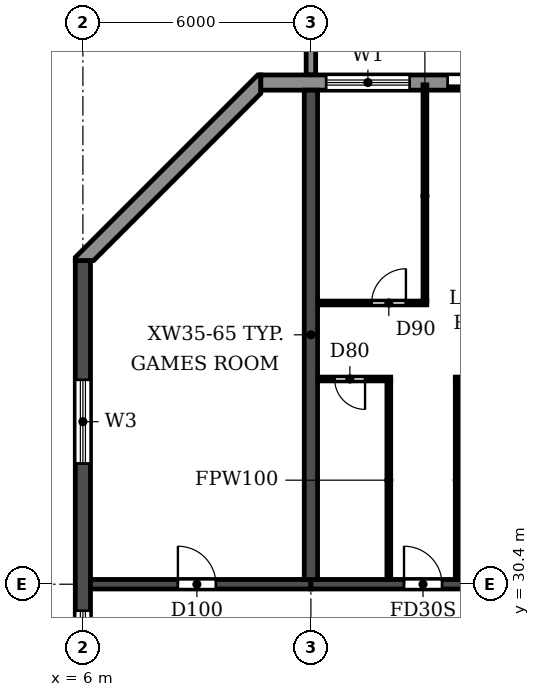
"""IFC4 building model, lengths in metres.
Left out: names, types, materials, properties, quantities, classifications, styles, units other than length and angle.
Written with IfcOpenShell. Run it as: python <this file> out.ifc"""

import sys

from ifc_helpers import new_model, si_unit, direction, frame, frame_2d, origin, place, context, subcontext, project, spatial, polyline, rectangle, outline, extrude, source, transform, mapped, element, fill, save


model = new_model("IFC4")
c1 = context("Model", 3, precision=1e-05, world=origin(), true_north=direction((0.0, 1.0)))
c2 = subcontext(c1, "Body", "Model", "MODEL_VIEW")
j1 = project(units=[si_unit("LENGTHUNIT", "METRE"), si_unit("PLANEANGLEUNIT", "RADIAN")], contexts=[c1])
p1 = place(None, origin())
s1 = spatial("IfcSite", under=j1, at=p1, CompositionType="ELEMENT")
p2 = place(p1, origin())
s2 = spatial("IfcBuilding", under=s1, at=p2, CompositionType="ELEMENT")
p3 = place(p2, frame((0.0, 0.0, 102.6)))
s3 = spatial("IfcBuildingStorey", under=s2, at=p3, CompositionType="ELEMENT", Elevation=102.6)
p4 = place(p3, frame((12.0, 30.525, 0.0), z_axis=(0.0, 0.0, 1.0), x_axis=(0.0, 1.0, 0.0)))
e1 = element("IfcWall", 1, at=p4, inside=s3, PredefinedType="SHEAR", context=c2, shape_type="SweptSolid", body=[
    extrude(rectangle(XDim=12.875, YDim=0.35, at=frame_2d((6.438, 0.0))), origin(), (0.0, 0.0, 1.0), 3.0),
])
p5 = place(p3, frame((6.0, 4.683, 0.0), z_axis=(0.0, 0.0, 1.0), x_axis=(0.0, 1.0, 0.0)))
e2 = element("IfcWall", 2, at=p5, inside=s3, PredefinedType="SHEAR", context=c2, shape_type="SweptSolid", body=[
    extrude(rectangle(XDim=34.234, YDim=0.4, at=frame_2d((17.117, 0.0))), origin(), (0.0, 0.0, 1.0), 3.0),
])
p6 = place(p5, frame((23.817, 0.0, 0.9)))
e3 = element("IfcOpeningElement", 3, at=p6, cuts=e2, PredefinedType="OPENING", context=c2, shape_type="SweptSolid", body=[
    extrude(rectangle(XDim=1.2, YDim=1.5, at=frame_2d((0.6, 0.75))), frame((0.0, 0.21, 0.0), z_axis=(0.0, -1.0, 0.0), x_axis=(1.0, 0.0, 0.0)), (0.0, 0.0, 1.0), 0.42),
])
p7 = place(p5, frame((8.017, 0.0, 0.9)))
e4 = element("IfcOpeningElement", 4, at=p7, cuts=e2, PredefinedType="OPENING", context=c2, shape_type="SweptSolid", body=[
    extrude(rectangle(XDim=1.2, YDim=1.5, at=frame_2d((0.6, 0.75))), frame((0.0, 0.21, 0.0), z_axis=(0.0, -1.0, 0.0), x_axis=(1.0, 0.0, 0.0)), (0.0, 0.0, 1.0), 0.42),
])
p8 = place(p5, frame((15.917, 0.0, 0.9)))
e5 = element("IfcOpeningElement", 5, at=p8, cuts=e2, PredefinedType="OPENING", context=c2, shape_type="SweptSolid", body=[
    extrude(rectangle(XDim=1.2, YDim=1.5, at=frame_2d((0.6, 0.75))), frame((0.0, 0.21, 0.0), z_axis=(0.0, -1.0, 0.0), x_axis=(1.0, 0.0, 0.0)), (0.0, 0.0, 1.0), 0.42),
])
p9 = place(p5, frame((28.894, 0.0, 0.6)))
e6 = element("IfcOpeningElement", 6, at=p9, cuts=e2, PredefinedType="OPENING", context=c2, shape_type="SweptSolid", body=[
    extrude(rectangle(XDim=2.2, YDim=1.8, at=frame_2d((1.1, 0.9))), frame((0.0, 0.21, 0.0), z_axis=(0.0, -1.0, 0.0), x_axis=(1.0, 0.0, 0.0)), (0.0, 0.0, 1.0), 0.42),
])
p10 = place(p5, frame((2.541, 0.0, 0.6)))
e7 = element("IfcOpeningElement", 7, at=p10, cuts=e2, PredefinedType="OPENING", context=c2, shape_type="SweptSolid", body=[
    extrude(rectangle(XDim=2.2, YDim=1.8, at=frame_2d((1.1, 0.9))), frame((0.0, 0.21, 0.0), z_axis=(0.0, -1.0, 0.0), x_axis=(1.0, 0.0, 0.0)), (0.0, 0.0, 1.0), 0.42),
])
p11 = place(p3, frame((6.2, 30.4, 0.0), z_axis=(0.0, 0.0, 1.0), x_axis=(1.0, 0.0, 0.0)))
e8 = element("IfcWall", 8, at=p11, inside=s3, PredefinedType="SHEAR", context=c2, shape_type="SweptSolid", body=[
    extrude(rectangle(XDim=5.8, YDim=0.25, at=frame_2d((2.9, 0.0))), origin(), (0.0, 0.0, 1.0), 2.4),
])
p12 = place(p11, frame((2.3, 0.0, 0.0)))
e9 = element("IfcOpeningElement", 9, at=p12, cuts=e8, PredefinedType="OPENING", context=c2, shape_type="SweptSolid", body=[
    extrude(rectangle(XDim=1.0, YDim=2.1, at=frame_2d((0.5, 1.05))), frame((0.0, 0.135, 0.0), z_axis=(0.0, -1.0, 0.0), x_axis=(1.0, 0.0, 0.0)), (0.0, 0.0, 1.0), 0.27),
])
p13 = place(p3, frame((12.0, 30.4, 0.0), z_axis=(0.0, 0.0, 1.0), x_axis=(1.0, 0.0, 0.0)))
e10 = element("IfcWall", 10, at=p13, inside=s3, PredefinedType="SHEAR", context=c2, shape_type="SweptSolid", body=[
    extrude(rectangle(XDim=6.0, YDim=0.25, at=frame_2d((3.0, 0.0))), origin(), (0.0, 0.0, 1.0), 2.4),
])
p14 = place(p13, frame((2.45, 0.0, 0.0)))
e11 = element("IfcOpeningElement", 11, at=p14, cuts=e10, PredefinedType="OPENING", context=c2, shape_type="SweptSolid", body=[
    extrude(rectangle(XDim=1.0, YDim=2.1, at=frame_2d((0.5, 1.05))), frame((0.0, 0.135, 0.0), z_axis=(0.0, -1.0, 0.0), x_axis=(1.0, 0.0, 0.0)), (0.0, 0.0, 1.0), 0.27),
])
p15 = place(p3, frame((91.317, 43.6, 0.0), z_axis=(0.0, 0.0, 1.0), x_axis=(-1.0, 0.0, 0.0)))
e12 = element("IfcWall", 12, at=p15, inside=s3, PredefinedType="STANDARD", context=c2, shape_type="SweptSolid", body=[
    extrude(rectangle(XDim=80.634, YDim=0.4, at=frame_2d((40.317, 0.0))), origin(), (0.0, 0.0, 1.0), 3.0),
])
p16 = place(p15, frame((76.717, 0.0, 0.9)))
e13 = element("IfcOpeningElement", 13, at=p16, cuts=e12, PredefinedType="OPENING", context=c2, shape_type="SweptSolid", body=[
    extrude(rectangle(XDim=2.2, YDim=1.5, at=frame_2d((1.1, 0.75))), frame((0.0, 0.21, 0.0), z_axis=(0.0, -1.0, 0.0), x_axis=(1.0, 0.0, 0.0)), (0.0, 0.0, 1.0), 0.42),
])
p17 = place(p15, frame((73.917, 0.0, 0.0)))
e14 = element("IfcOpeningElement", 14, at=p17, cuts=e12, PredefinedType="OPENING", context=c2, shape_type="SweptSolid", body=[
    extrude(rectangle(XDim=1.8, YDim=2.4, at=frame_2d((0.9, 1.2))), frame((0.0, 0.21, 0.0), z_axis=(0.0, -1.0, 0.0), x_axis=(1.0, 0.0, 0.0)), (0.0, 0.0, 1.0), 0.42),
])
p18 = place(p15, frame((70.717, 0.0, 0.9)))
e15 = element("IfcOpeningElement", 15, at=p18, cuts=e12, PredefinedType="OPENING", context=c2, shape_type="SweptSolid", body=[
    extrude(rectangle(XDim=2.2, YDim=1.5, at=frame_2d((1.1, 0.75))), frame((0.0, 0.21, 0.0), z_axis=(0.0, -1.0, 0.0), x_axis=(1.0, 0.0, 0.0)), (0.0, 0.0, 1.0), 0.42),
])
p19 = place(p15, frame((67.717, 0.0, 0.9)))
e16 = element("IfcOpeningElement", 16, at=p19, cuts=e12, PredefinedType="OPENING", context=c2, shape_type="SweptSolid", body=[
    extrude(rectangle(XDim=2.2, YDim=1.5, at=frame_2d((1.1, 0.75))), frame((0.0, 0.21, 0.0), z_axis=(0.0, -1.0, 0.0), x_axis=(1.0, 0.0, 0.0)), (0.0, 0.0, 1.0), 0.42),
])
p20 = place(p15, frame((64.917, 0.0, 0.0)))
e17 = element("IfcOpeningElement", 17, at=p20, cuts=e12, PredefinedType="OPENING", context=c2, shape_type="SweptSolid", body=[
    extrude(rectangle(XDim=1.8, YDim=2.4, at=frame_2d((0.9, 1.2))), frame((0.0, 0.21, 0.0), z_axis=(0.0, -1.0, 0.0), x_axis=(1.0, 0.0, 0.0)), (0.0, 0.0, 1.0), 0.42),
])
p21 = place(p15, frame((61.717, 0.0, 0.9)))
e18 = element("IfcOpeningElement", 18, at=p21, cuts=e12, PredefinedType="OPENING", context=c2, shape_type="SweptSolid", body=[
    extrude(rectangle(XDim=2.2, YDim=1.5, at=frame_2d((1.1, 0.75))), frame((0.0, 0.21, 0.0), z_axis=(0.0, -1.0, 0.0), x_axis=(1.0, 0.0, 0.0)), (0.0, 0.0, 1.0), 0.42),
])
p22 = place(p15, frame((58.717, 0.0, 0.9)))
e19 = element("IfcOpeningElement", 19, at=p22, cuts=e12, PredefinedType="OPENING", context=c2, shape_type="SweptSolid", body=[
    extrude(rectangle(XDim=2.2, YDim=1.5, at=frame_2d((1.1, 0.75))), frame((0.0, 0.21, 0.0), z_axis=(0.0, -1.0, 0.0), x_axis=(1.0, 0.0, 0.0)), (0.0, 0.0, 1.0), 0.42),
])
p23 = place(p15, frame((55.717, 0.0, 0.9)))
e20 = element("IfcOpeningElement", 20, at=p23, cuts=e12, PredefinedType="OPENING", context=c2, shape_type="SweptSolid", body=[
    extrude(rectangle(XDim=2.2, YDim=1.5, at=frame_2d((1.1, 0.75))), frame((0.0, 0.21, 0.0), z_axis=(0.0, -1.0, 0.0), x_axis=(1.0, 0.0, 0.0)), (0.0, 0.0, 1.0), 0.42),
])
p24 = place(p15, frame((52.717, 0.0, 0.9)))
e21 = element("IfcOpeningElement", 21, at=p24, cuts=e12, PredefinedType="OPENING", context=c2, shape_type="SweptSolid", body=[
    extrude(rectangle(XDim=2.2, YDim=1.5, at=frame_2d((1.1, 0.75))), frame((0.0, 0.21, 0.0), z_axis=(0.0, -1.0, 0.0), x_axis=(1.0, 0.0, 0.0)), (0.0, 0.0, 1.0), 0.42),
])
p25 = place(p15, frame((49.917, 0.0, 0.0)))
e22 = element("IfcOpeningElement", 22, at=p25, cuts=e12, PredefinedType="OPENING", context=c2, shape_type="SweptSolid", body=[
    extrude(rectangle(XDim=1.8, YDim=2.4, at=frame_2d((0.9, 1.2))), frame((0.0, 0.21, 0.0), z_axis=(0.0, -1.0, 0.0), x_axis=(1.0, 0.0, 0.0)), (0.0, 0.0, 1.0), 0.42),
])
p26 = place(p15, frame((46.717, 0.0, 0.9)))
e23 = element("IfcOpeningElement", 23, at=p26, cuts=e12, PredefinedType="OPENING", context=c2, shape_type="SweptSolid", body=[
    extrude(rectangle(XDim=2.2, YDim=1.5, at=frame_2d((1.1, 0.75))), frame((0.0, 0.21, 0.0), z_axis=(0.0, -1.0, 0.0), x_axis=(1.0, 0.0, 0.0)), (0.0, 0.0, 1.0), 0.42),
])
p27 = place(p15, frame((43.917, 0.0, 0.0)))
e24 = element("IfcOpeningElement", 24, at=p27, cuts=e12, PredefinedType="OPENING", context=c2, shape_type="SweptSolid", body=[
    extrude(rectangle(XDim=1.8, YDim=2.4, at=frame_2d((0.9, 1.2))), frame((0.0, 0.21, 0.0), z_axis=(0.0, -1.0, 0.0), x_axis=(1.0, 0.0, 0.0)), (0.0, 0.0, 1.0), 0.42),
])
p28 = place(p15, frame((40.717, 0.0, 0.9)))
e25 = element("IfcOpeningElement", 25, at=p28, cuts=e12, PredefinedType="OPENING", context=c2, shape_type="SweptSolid", body=[
    extrude(rectangle(XDim=2.2, YDim=1.5, at=frame_2d((1.1, 0.75))), frame((0.0, 0.21, 0.0), z_axis=(0.0, -1.0, 0.0), x_axis=(1.0, 0.0, 0.0)), (0.0, 0.0, 1.0), 0.42),
])
p29 = place(p15, frame((37.717, 0.0, 0.9)))
e26 = element("IfcOpeningElement", 26, at=p29, cuts=e12, PredefinedType="OPENING", context=c2, shape_type="SweptSolid", body=[
    extrude(rectangle(XDim=2.2, YDim=1.5, at=frame_2d((1.1, 0.75))), frame((0.0, 0.21, 0.0), z_axis=(0.0, -1.0, 0.0), x_axis=(1.0, 0.0, 0.0)), (0.0, 0.0, 1.0), 0.42),
])
p30 = place(p15, frame((34.917, 0.0, 0.0)))
e27 = element("IfcOpeningElement", 27, at=p30, cuts=e12, PredefinedType="OPENING", context=c2, shape_type="SweptSolid", body=[
    extrude(rectangle(XDim=1.8, YDim=2.4, at=frame_2d((0.9, 1.2))), frame((0.0, 0.21, 0.0), z_axis=(0.0, -1.0, 0.0), x_axis=(1.0, 0.0, 0.0)), (0.0, 0.0, 1.0), 0.42),
])
p31 = place(p15, frame((31.717, 0.0, 0.9)))
e28 = element("IfcOpeningElement", 28, at=p31, cuts=e12, PredefinedType="OPENING", context=c2, shape_type="SweptSolid", body=[
    extrude(rectangle(XDim=2.2, YDim=1.5, at=frame_2d((1.1, 0.75))), frame((0.0, 0.21, 0.0), z_axis=(0.0, -1.0, 0.0), x_axis=(1.0, 0.0, 0.0)), (0.0, 0.0, 1.0), 0.42),
])
p32 = place(p15, frame((28.717, 0.0, 0.9)))
e29 = element("IfcOpeningElement", 29, at=p32, cuts=e12, PredefinedType="OPENING", context=c2, shape_type="SweptSolid", body=[
    extrude(rectangle(XDim=2.2, YDim=1.5, at=frame_2d((1.1, 0.75))), frame((0.0, 0.21, 0.0), z_axis=(0.0, -1.0, 0.0), x_axis=(1.0, 0.0, 0.0)), (0.0, 0.0, 1.0), 0.42),
])
p33 = place(p15, frame((25.917, 0.0, 0.0)))
e30 = element("IfcOpeningElement", 30, at=p33, cuts=e12, PredefinedType="OPENING", context=c2, shape_type="SweptSolid", body=[
    extrude(rectangle(XDim=1.8, YDim=2.4, at=frame_2d((0.9, 1.2))), frame((0.0, 0.21, 0.0), z_axis=(0.0, -1.0, 0.0), x_axis=(1.0, 0.0, 0.0)), (0.0, 0.0, 1.0), 0.42),
])
p34 = place(p15, frame((22.717, 0.0, 0.9)))
e31 = element("IfcOpeningElement", 31, at=p34, cuts=e12, PredefinedType="OPENING", context=c2, shape_type="SweptSolid", body=[
    extrude(rectangle(XDim=2.2, YDim=1.5, at=frame_2d((1.1, 0.75))), frame((0.0, 0.21, 0.0), z_axis=(0.0, -1.0, 0.0), x_axis=(1.0, 0.0, 0.0)), (0.0, 0.0, 1.0), 0.42),
])
p35 = place(p15, frame((19.717, 0.0, 0.9)))
e32 = element("IfcOpeningElement", 32, at=p35, cuts=e12, PredefinedType="OPENING", context=c2, shape_type="SweptSolid", body=[
    extrude(rectangle(XDim=2.2, YDim=1.5, at=frame_2d((1.1, 0.75))), frame((0.0, 0.21, 0.0), z_axis=(0.0, -1.0, 0.0), x_axis=(1.0, 0.0, 0.0)), (0.0, 0.0, 1.0), 0.42),
])
p36 = place(p15, frame((16.917, 0.0, 0.0)))
e33 = element("IfcOpeningElement", 33, at=p36, cuts=e12, PredefinedType="OPENING", context=c2, shape_type="SweptSolid", body=[
    extrude(rectangle(XDim=1.8, YDim=2.4, at=frame_2d((0.9, 1.2))), frame((0.0, 0.21, 0.0), z_axis=(0.0, -1.0, 0.0), x_axis=(1.0, 0.0, 0.0)), (0.0, 0.0, 1.0), 0.42),
])
p37 = place(p15, frame((13.717, 0.0, 0.9)))
e34 = element("IfcOpeningElement", 34, at=p37, cuts=e12, PredefinedType="OPENING", context=c2, shape_type="SweptSolid", body=[
    extrude(rectangle(XDim=2.2, YDim=1.5, at=frame_2d((1.1, 0.75))), frame((0.0, 0.21, 0.0), z_axis=(0.0, -1.0, 0.0), x_axis=(1.0, 0.0, 0.0)), (0.0, 0.0, 1.0), 0.42),
])
p38 = place(p15, frame((10.917, 0.0, 0.0)))
e35 = element("IfcOpeningElement", 35, at=p38, cuts=e12, PredefinedType="OPENING", context=c2, shape_type="SweptSolid", body=[
    extrude(rectangle(XDim=1.8, YDim=2.4, at=frame_2d((0.9, 1.2))), frame((0.0, 0.21, 0.0), z_axis=(0.0, -1.0, 0.0), x_axis=(1.0, 0.0, 0.0)), (0.0, 0.0, 1.0), 0.42),
])
p39 = place(p15, frame((7.717, 0.0, 0.9)))
e36 = element("IfcOpeningElement", 36, at=p39, cuts=e12, PredefinedType="OPENING", context=c2, shape_type="SweptSolid", body=[
    extrude(rectangle(XDim=2.2, YDim=1.5, at=frame_2d((1.1, 0.75))), frame((0.0, 0.21, 0.0), z_axis=(0.0, -1.0, 0.0), x_axis=(1.0, 0.0, 0.0)), (0.0, 0.0, 1.0), 0.42),
])
p40 = place(p15, frame((4.717, 0.0, 0.9)))
e37 = element("IfcOpeningElement", 37, at=p40, cuts=e12, PredefinedType="OPENING", context=c2, shape_type="SweptSolid", body=[
    extrude(rectangle(XDim=2.2, YDim=1.5, at=frame_2d((1.1, 0.75))), frame((0.0, 0.21, 0.0), z_axis=(0.0, -1.0, 0.0), x_axis=(1.0, 0.0, 0.0)), (0.0, 0.0, 1.0), 0.42),
])
p41 = place(p15, frame((1.917, 0.0, 0.0)))
e38 = element("IfcOpeningElement", 38, at=p41, cuts=e12, PredefinedType="OPENING", context=c2, shape_type="SweptSolid", body=[
    extrude(rectangle(XDim=1.8, YDim=2.4, at=frame_2d((0.9, 1.2))), frame((0.0, 0.21, 0.0), z_axis=(0.0, -1.0, 0.0), x_axis=(1.0, 0.0, 0.0)), (0.0, 0.0, 1.0), 0.42),
])
p42 = place(p3, origin())
e39 = element("IfcWall", 39, at=p42, inside=s3, PredefinedType="STANDARD", context=c2, shape_type="SweptSolid", body=[
    extrude(outline(polyline([(10.683, 43.8), (10.6, 43.8), (5.8, 39.0), (5.8, 38.917), (6.283, 38.917), (10.683, 43.317), (10.683, 43.8)])), origin(), (0.0, 0.0, 1.0), 3.0),
])
m1 = source(origin(), c2, "Body", "SweptSolid", [
    extrude(outline(polyline([(0.0, 0.0), (0.25, 0.0), (0.25, 3.1), (0.0, 3.1), (0.0, 0.0)])), origin(), (0.0, 0.0, 1.0), 3.1),
])
p43 = place(p3, frame((11.875, 43.8, 0.0)))
e40 = element("IfcWall", 40, at=p43, inside=s3, PredefinedType="STANDARD", context=c2, shape_type="MappedRepresentation", body=[
    mapped(m1, transform((0.0, 0.0, 0.0))),
])
p44 = place(p3, frame((12.185, 35.8, 0.0), z_axis=(0.0, 0.0, 1.0), x_axis=(1.0, 0.0, 0.0)))
e41 = element("IfcWall", 41, at=p44, inside=s3, PredefinedType="PARTITIONING", context=c2, shape_type="SweptSolid", body=[
    extrude(rectangle(XDim=1.915, YDim=0.1, at=frame_2d((0.958, 0.0))), origin(), (0.0, 0.0, 1.0), 3.0),
])
p45 = place(p44, frame((0.44, 0.0, 0.0)))
e42 = element("IfcOpeningElement", 42, at=p45, cuts=e41, PredefinedType="OPENING", context=c2, shape_type="SweptSolid", body=[
    extrude(rectangle(XDim=0.8, YDim=2.1, at=frame_2d((0.4, 1.05))), frame((0.0, 0.06, 0.0), z_axis=(0.0, -1.0, 0.0), x_axis=(1.0, 0.0, 0.0)), (0.0, 0.0, 1.0), 0.12),
])
p46 = place(p3, frame((15.8, 35.8, 0.0), z_axis=(0.0, 0.0, 1.0), x_axis=(1.0, 0.0, 0.0)))
e43 = element("IfcWall", 43, at=p46, inside=s3, PredefinedType="PARTITIONING", context=c2, shape_type="SweptSolid", body=[
    extrude(rectangle(XDim=2.015, YDim=0.1, at=frame_2d((1.007, 0.0))), origin(), (0.0, 0.0, 1.0), 3.0),
])
p47 = place(p46, frame((0.675, 0.0, 0.0)))
e44 = element("IfcOpeningElement", 44, at=p47, cuts=e43, PredefinedType="OPENING", context=c2, shape_type="SweptSolid", body=[
    extrude(rectangle(XDim=0.9, YDim=2.1, at=frame_2d((0.45, 1.05))), frame((0.0, 0.06, 0.0), z_axis=(0.0, -1.0, 0.0), x_axis=(1.0, 0.0, 0.0)), (0.0, 0.0, 1.0), 0.12),
])
p48 = place(p3, frame((12.185, 37.8, 0.0), z_axis=(0.0, 0.0, 1.0), x_axis=(1.0, 0.0, 0.0)))
e45 = element("IfcWall", 45, at=p48, inside=s3, PredefinedType="PARTITIONING", context=c2, shape_type="SweptSolid", body=[
    extrude(rectangle(XDim=2.865, YDim=0.1, at=frame_2d((1.433, 0.0))), origin(), (0.0, 0.0, 1.0), 3.0),
])
p49 = place(p48, frame((1.415, 0.0, 0.0)))
e46 = element("IfcOpeningElement", 46, at=p49, cuts=e45, PredefinedType="OPENING", context=c2, shape_type="SweptSolid", body=[
    extrude(rectangle(XDim=0.9, YDim=2.1, at=frame_2d((0.45, 1.05))), frame((0.0, 0.06, 0.0), z_axis=(0.0, -1.0, 0.0), x_axis=(1.0, 0.0, 0.0)), (0.0, 0.0, 1.0), 0.12),
])
p50 = place(p3, frame((14.05, 30.535, 0.0), z_axis=(0.0, 0.0, 1.0), x_axis=(0.0, 1.0, 0.0)))
e47 = element("IfcWall", 47, at=p50, inside=s3, PredefinedType="PARTITIONING", context=c2, shape_type="SweptSolid", body=[
    extrude(rectangle(XDim=5.215, YDim=0.1, at=frame_2d((2.607, 0.0))), origin(), (0.0, 0.0, 1.0), 3.0),
])
p51 = place(p3, frame((15.0, 37.85, 0.0), z_axis=(0.0, 0.0, 1.0), x_axis=(0.0, 1.0, 0.0)))
e48 = element("IfcWall", 48, at=p51, inside=s3, PredefinedType="PARTITIONING", context=c2, shape_type="SweptSolid", body=[
    extrude(rectangle(XDim=5.69, YDim=0.1, at=frame_2d((2.845, 0.0))), origin(), (0.0, 0.0, 1.0), 3.0),
])
p52 = place(p3, frame((15.85, 30.535, 0.0), z_axis=(0.0, 0.0, 1.0), x_axis=(0.0, 1.0, 0.0)))
e49 = element("IfcWall", 49, at=p52, inside=s3, PredefinedType="PARTITIONING", context=c2, shape_type="SweptSolid", body=[
    extrude(rectangle(XDim=5.215, YDim=0.1, at=frame_2d((2.607, 0.0))), origin(), (0.0, 0.0, 1.0), 3.0),
])
p53 = place(p16, origin())
e50 = element("IfcWindow", 50, at=p53, inside=s3, PartitioningType="DOUBLE_PANEL_HORIZONTAL", PredefinedType="WINDOW", context=c2, shape_type="SweptSolid", body=[
    extrude(rectangle(XDim=2.2, YDim=1.5, at=frame_2d((1.1, 0.75))), frame((0.0, 0.03, 0.0), z_axis=(0.0, -1.0, 0.0), x_axis=(1.0, 0.0, 0.0)), (0.0, 0.0, 1.0), 0.06),
])
fill(e13, e50)
p54 = place(p17, origin())
e51 = element("IfcDoor", 51, at=p54, inside=s3, OperationType="DOUBLE_DOOR_SLIDING", PredefinedType="DOOR", context=c2, shape_type="SweptSolid", body=[
    extrude(rectangle(XDim=1.8, YDim=2.4, at=frame_2d((0.9, 1.2))), frame((0.0, 0.025, 0.0), z_axis=(0.0, -1.0, 0.0), x_axis=(1.0, 0.0, 0.0)), (0.0, 0.0, 1.0), 0.05),
])
fill(e14, e51)
p55 = place(p6, origin())
e52 = element("IfcWindow", 52, at=p55, inside=s3, PartitioningType="SINGLE_PANEL", PredefinedType="WINDOW", context=c2, shape_type="SweptSolid", body=[
    extrude(rectangle(XDim=1.2, YDim=1.5, at=frame_2d((0.6, 0.75))), frame((0.0, 0.03, 0.0), z_axis=(0.0, -1.0, 0.0), x_axis=(1.0, 0.0, 0.0)), (0.0, 0.0, 1.0), 0.06),
])
fill(e3, e52)
p56 = place(p9, origin())
e53 = element("IfcWindow", 53, at=p56, inside=s3, PartitioningType="DOUBLE_PANEL_HORIZONTAL", PredefinedType="WINDOW", context=c2, shape_type="SweptSolid", body=[
    extrude(rectangle(XDim=2.2, YDim=1.8, at=frame_2d((1.1, 0.9))), frame((0.0, 0.03, 0.0), z_axis=(0.0, -1.0, 0.0), x_axis=(1.0, 0.0, 0.0)), (0.0, 0.0, 1.0), 0.06),
])
fill(e6, e53)
p57 = place(p12, origin())
e54 = element("IfcDoor", 54, at=p57, inside=s3, OperationType="SINGLE_SWING_LEFT", PredefinedType="DOOR", context=c2, shape_type="SweptSolid", body=[
    extrude(rectangle(XDim=1.0, YDim=2.1, at=frame_2d((0.5, 1.05))), frame((0.0, 0.025, 0.0), z_axis=(0.0, -1.0, 0.0), x_axis=(1.0, 0.0, 0.0)), (0.0, 0.0, 1.0), 0.05),
])
fill(e9, e54)
p58 = place(p45, frame((0.8, 0.0, 0.0), z_axis=(0.0, 0.0, 1.0), x_axis=(-1.0, 0.0, 0.0)))
e55 = element("IfcDoor", 55, at=p58, inside=s3, OperationType="SINGLE_SWING_LEFT", PredefinedType="DOOR", context=c2, shape_type="SweptSolid", body=[
    extrude(rectangle(XDim=0.8, YDim=2.1, at=frame_2d((0.4, 1.05))), frame((0.0, 0.025, 0.0), z_axis=(0.0, -1.0, 0.0), x_axis=(1.0, 0.0, 0.0)), (0.0, 0.0, 1.0), 0.05),
])
fill(e42, e55)
p59 = place(p49, origin())
e56 = element("IfcDoor", 56, at=p59, inside=s3, OperationType="SINGLE_SWING_RIGHT", PredefinedType="DOOR", context=c2, shape_type="SweptSolid", body=[
    extrude(rectangle(XDim=0.9, YDim=2.1, at=frame_2d((0.45, 1.05))), frame((0.0, 0.025, 0.0), z_axis=(0.0, -1.0, 0.0), x_axis=(1.0, 0.0, 0.0)), (0.0, 0.0, 1.0), 0.05),
])
fill(e46, e56)
p60 = place(p14, origin())
e57 = element("IfcDoor", 57, at=p60, inside=s3, OperationType="SINGLE_SWING_LEFT", PredefinedType="DOOR", context=c2, shape_type="SweptSolid", body=[
    extrude(rectangle(XDim=1.0, YDim=2.1, at=frame_2d((0.5, 1.05))), frame((0.0, 0.025, 0.0), z_axis=(0.0, -1.0, 0.0), x_axis=(1.0, 0.0, 0.0)), (0.0, 0.0, 1.0), 0.05),
])
fill(e11, e57)
save(model, sys.argv[1])
